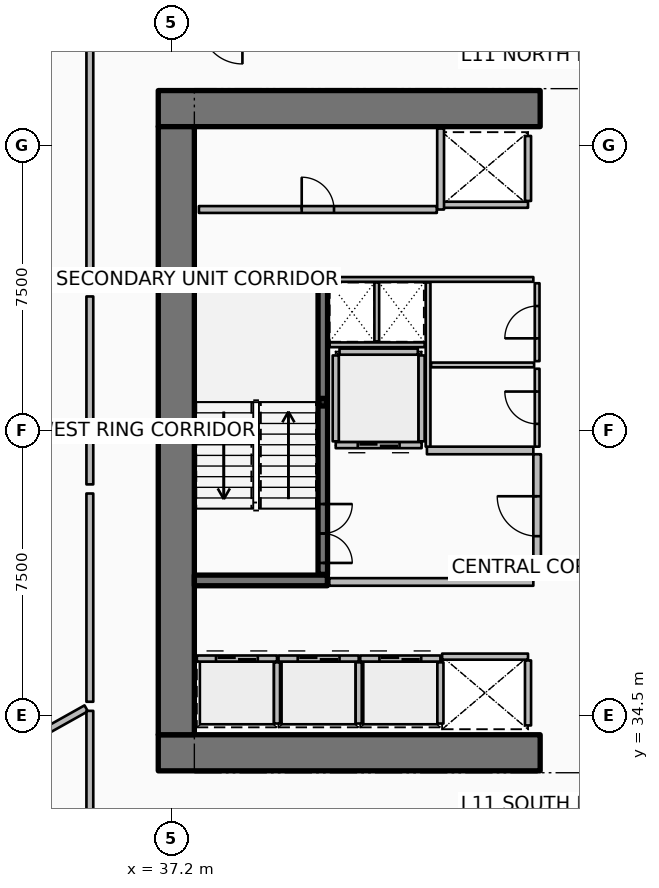
"""IFC4 building model, lengths in metres.
Left out: names, types, materials, properties, quantities, classifications, styles, units other than length and angle.
Written with IfcOpenShell. Run it as: python <this file> out.ifc"""

import sys

from ifc_helpers import new_model, si_unit, direction, frame, frame_2d, origin, origin_2d, place, context, subcontext, project, spatial, rectangle, hollow_rectangle, extrude, element, fill, save


model = new_model("IFC4")
c1 = context("Model", 3, precision=1e-05, world=origin(), true_north=direction((0.0, 1.0)))
c2 = subcontext(c1, "Body", "Model", "MODEL_VIEW")
j1 = project(units=[si_unit("LENGTHUNIT", "METRE"), si_unit("PLANEANGLEUNIT", "RADIAN")], contexts=[c1])
p1 = place(None, origin())
s1 = spatial("IfcSite", under=j1, at=p1, CompositionType="ELEMENT")
p2 = place(p1, origin())
s2 = spatial("IfcBuilding", under=s1, at=p2, CompositionType="ELEMENT")
p3 = place(p2, frame((0.0, 0.0, 48.9)))
s3 = spatial("IfcBuildingStorey", under=s2, at=p3, CompositionType="ELEMENT", Elevation=48.9)
for number, where, z_axis, x_axis in (
    (1, (36.85, 33.525, 0.0), (0.0, 0.0, 1.0), (1.0, 0.0, 0.0)),
    (2, (36.85, 50.475, 0.0), (0.0, 0.0, 1.0), (1.0, 0.0, 0.0)),
):
    element("IfcWall", number, at=place(p3, frame(where, z_axis=z_axis, x_axis=x_axis)), inside=s3, PredefinedType="SHEAR", context=c2, shape_type="SweptSolid", body=[
        extrude(rectangle(XDim=10.05, YDim=0.95, at=frame_2d((5.025, 0.0))), origin(), (0.0, 0.0, 1.0), 3.75),
    ])
p4 = place(p3, frame((37.325, 34.0, 0.0), z_axis=(0.0, 0.0, 1.0), x_axis=(0.0, 1.0, 0.0)))
e3 = element("IfcWall", 3, at=p4, inside=s3, PredefinedType="SHEAR", context=c2, shape_type="SweptSolid", body=[
    extrude(rectangle(XDim=16.0, YDim=0.95, at=frame_2d((8.0, 0.0))), origin(), (0.0, 0.0, 1.0), 3.75),
])
for number, where, z_axis, x_axis in (
    (4, (37.8, 38.06, 0.0), (0.0, 0.0, 1.0), (1.0, 0.0, 0.0)),
    (5, (37.8, 45.94, 0.0), (0.0, 0.0, 1.0), (1.0, 0.0, 0.0)),
):
    element("IfcWall", number, at=place(p3, frame(where, z_axis=z_axis, x_axis=x_axis)), inside=s3, PredefinedType="SHEAR", context=c2, shape_type="SweptSolid", body=[
        extrude(rectangle(XDim=3.5, YDim=0.28, at=frame_2d((1.75, 0.0))), origin(), (0.0, 0.0, 1.0), 3.75),
    ])
p5 = place(p3, frame((41.18, 42.75, 0.0), z_axis=(0.0, 0.0, 1.0), x_axis=(1.0, 0.0, 0.0)))
e6 = element("IfcColumn", 6, at=p5, inside=s3, PredefinedType="COLUMN", context=c2, shape_type="SweptSolid", body=[
    extrude(hollow_rectangle(XDim=0.2, YDim=0.2, WallThickness=0.01, InnerFilletRadius=0.01, OuterFilletRadius=0.02, at=origin_2d()), origin(), (0.0, 0.0, 1.0), 1.67),
])
p6 = place(p3, frame((41.18, 38.22, 0.0), z_axis=(0.0, 0.0, 1.0), x_axis=(0.0, 1.0, 0.0)))
e7 = element("IfcWall", 7, at=p6, inside=s3, PredefinedType="SOLIDWALL", context=c2, shape_type="SweptSolid", body=[
    extrude(rectangle(XDim=7.56, YDim=0.25, at=frame_2d((3.78, 0.0))), origin(), (0.0, 0.0, 1.0), 3.5),
])
p7 = place(p6, frame((0.3, 0.0, 0.0)))
e8 = element("IfcOpeningElement", 8, at=p7, cuts=e7, PredefinedType="OPENING", context=c2, shape_type="SweptSolid", body=[
    extrude(rectangle(XDim=1.55, YDim=2.15, at=frame_2d((0.775, 1.075))), frame((0.0, 0.135, 0.0), z_axis=(0.0, -1.0, 0.0), x_axis=(1.0, 0.0, 0.0)), (0.0, 0.0, 1.0), 0.27),
])
p8 = place(p3, frame((37.865, 36.005, 0.0), z_axis=(0.0, 0.0, 1.0), x_axis=(1.0, 0.0, 0.0)))
e9 = element("IfcWall", 9, at=p8, inside=s3, PredefinedType="PARTITIONING", context=c2, shape_type="SweptSolid", body=[
    extrude(rectangle(XDim=2.11, YDim=0.16, at=frame_2d((1.055, 0.0))), origin(), (0.0, 0.0, 1.0), 3.5),
])
p9 = place(p8, frame((0.505, 0.0, 0.0)))
e10 = element("IfcOpeningElement", 10, at=p9, cuts=e9, PredefinedType="OPENING", context=c2, shape_type="SweptSolid", body=[
    extrude(rectangle(XDim=1.1, YDim=2.1, at=frame_2d((0.55, 1.05))), frame((0.0, 0.09, 0.0), z_axis=(0.0, -1.0, 0.0), x_axis=(1.0, 0.0, 0.0)), (0.0, 0.0, 1.0), 0.18),
])
p10 = place(p3, frame((39.975, 34.295, 0.0), z_axis=(0.0, 0.0, 1.0), x_axis=(0.0, 1.0, 0.0)))
e11 = element("IfcWall", 11, at=p10, inside=s3, PredefinedType="PARTITIONING", context=c2, shape_type="SweptSolid", body=[
    extrude(rectangle(XDim=1.61, YDim=0.16, at=frame_2d((0.805, 0.0))), origin(), (0.0, 0.0, 1.0), 3.5),
])
p11 = place(p3, frame((40.015, 36.005, 0.0), z_axis=(0.0, 0.0, 1.0), x_axis=(1.0, 0.0, 0.0)))
e12 = element("IfcWall", 12, at=p11, inside=s3, PredefinedType="PARTITIONING", context=c2, shape_type="SweptSolid", body=[
    extrude(rectangle(XDim=2.11, YDim=0.16, at=frame_2d((1.055, 0.0))), origin(), (0.0, 0.0, 1.0), 3.5),
])
p12 = place(p11, frame((0.505, 0.0, 0.0)))
e13 = element("IfcOpeningElement", 13, at=p12, cuts=e12, PredefinedType="OPENING", context=c2, shape_type="SweptSolid", body=[
    extrude(rectangle(XDim=1.1, YDim=2.1, at=frame_2d((0.55, 1.05))), frame((0.0, 0.09, 0.0), z_axis=(0.0, -1.0, 0.0), x_axis=(1.0, 0.0, 0.0)), (0.0, 0.0, 1.0), 0.18),
])
p13 = place(p3, frame((42.125, 34.295, 0.0), z_axis=(0.0, 0.0, 1.0), x_axis=(0.0, 1.0, 0.0)))
e14 = element("IfcWall", 14, at=p13, inside=s3, PredefinedType="PARTITIONING", context=c2, shape_type="SweptSolid", body=[
    extrude(rectangle(XDim=1.61, YDim=0.16, at=frame_2d((0.805, 0.0))), origin(), (0.0, 0.0, 1.0), 3.5),
])
p14 = place(p3, frame((42.165, 36.005, 0.0), z_axis=(0.0, 0.0, 1.0), x_axis=(1.0, 0.0, 0.0)))
e15 = element("IfcWall", 15, at=p14, inside=s3, PredefinedType="PARTITIONING", context=c2, shape_type="SweptSolid", body=[
    extrude(rectangle(XDim=2.11, YDim=0.16, at=frame_2d((1.055, 0.0))), origin(), (0.0, 0.0, 1.0), 3.5),
])
p15 = place(p14, frame((0.505, 0.0, 0.0)))
e16 = element("IfcOpeningElement", 16, at=p15, cuts=e15, PredefinedType="OPENING", context=c2, shape_type="SweptSolid", body=[
    extrude(rectangle(XDim=1.1, YDim=2.1, at=frame_2d((0.55, 1.05))), frame((0.0, 0.09, 0.0), z_axis=(0.0, -1.0, 0.0), x_axis=(1.0, 0.0, 0.0)), (0.0, 0.0, 1.0), 0.18),
])
p16 = place(p3, frame((44.275, 34.295, 0.0), z_axis=(0.0, 0.0, 1.0), x_axis=(0.0, 1.0, 0.0)))
e17 = element("IfcWall", 17, at=p16, inside=s3, PredefinedType="PARTITIONING", context=c2, shape_type="SweptSolid", body=[
    extrude(rectangle(XDim=1.61, YDim=0.16, at=frame_2d((0.805, 0.0))), origin(), (0.0, 0.0, 1.0), 3.5),
])
p17 = place(p3, frame((46.58, 47.945, 0.0), z_axis=(0.0, 0.0, 1.0), x_axis=(-1.0, 0.0, 0.0)))
e18 = element("IfcWall", 18, at=p17, inside=s3, PredefinedType="PARTITIONING", context=c2, shape_type="SweptSolid", body=[
    extrude(rectangle(XDim=2.26, YDim=0.16, at=frame_2d((1.13, 0.0))), origin(), (0.0, 0.0, 1.0), 3.5),
])
p18 = place(p3, frame((46.58, 48.045, 0.0), z_axis=(0.0, 0.0, 1.0), x_axis=(0.0, 1.0, 0.0)))
e19 = element("IfcWall", 19, at=p18, inside=s3, PredefinedType="PARTITIONING", context=c2, shape_type="SweptSolid", body=[
    extrude(rectangle(XDim=1.71, YDim=0.16, at=frame_2d((0.855, 0.0))), origin(), (0.0, 0.0, 1.0), 3.5),
])
p19 = place(p3, frame((44.32, 36.055, 0.0), z_axis=(0.0, 0.0, 1.0), x_axis=(1.0, 0.0, 0.0)))
e20 = element("IfcWall", 20, at=p19, inside=s3, PredefinedType="PARTITIONING", context=c2, shape_type="SweptSolid", body=[
    extrude(rectangle(XDim=2.26, YDim=0.16, at=frame_2d((1.13, 0.0))), origin(), (0.0, 0.0, 1.0), 3.5),
])
p20 = place(p3, frame((46.58, 34.245, 0.0), z_axis=(0.0, 0.0, 1.0), x_axis=(0.0, 1.0, 0.0)))
e21 = element("IfcWall", 21, at=p20, inside=s3, PredefinedType="PARTITIONING", context=c2, shape_type="SweptSolid", body=[
    extrude(rectangle(XDim=1.71, YDim=0.16, at=frame_2d((0.855, 0.0))), origin(), (0.0, 0.0, 1.0), 3.5),
])
p21 = place(p3, frame((43.78, 41.62, 0.0), z_axis=(0.0, 0.0, 1.0), x_axis=(-1.0, 0.0, 0.0)))
e22 = element("IfcWall", 22, at=p21, inside=s3, PredefinedType="PARTITIONING", context=c2, shape_type="SweptSolid", body=[
    extrude(rectangle(XDim=2.26, YDim=0.16, at=frame_2d((1.13, 0.0))), origin(), (0.0, 0.0, 1.0), 3.5),
])
p22 = place(p21, frame((0.58, 0.0, 0.0)))
e23 = element("IfcOpeningElement", 23, at=p22, cuts=e22, PredefinedType="OPENING", context=c2, shape_type="SweptSolid", body=[
    extrude(rectangle(XDim=1.1, YDim=2.1, at=frame_2d((0.55, 1.05))), frame((0.0, 0.09, 0.0), z_axis=(0.0, -1.0, 0.0), x_axis=(1.0, 0.0, 0.0)), (0.0, 0.0, 1.0), 0.18),
])
for number, where, z_axis, x_axis in (
    (24, (43.78, 41.72, 0.0), (0.0, 0.0, 1.0), (0.0, 1.0, 0.0)),
    (25, (41.52, 41.72, 0.0), (0.0, 0.0, 1.0), (0.0, 1.0, 0.0)),
):
    element("IfcWall", number, at=place(p3, frame(where, z_axis=z_axis, x_axis=x_axis)), inside=s3, PredefinedType="PARTITIONING", context=c2, shape_type="SweptSolid", body=[
        extrude(rectangle(XDim=2.26, YDim=0.16, at=frame_2d((1.13, 0.0))), origin(), (0.0, 0.0, 1.0), 3.5),
    ])
p23 = place(p3, frame((41.62, 44.08, 0.0), z_axis=(0.0, 0.0, 1.0), x_axis=(1.0, 0.0, 0.0)))
e26 = element("IfcWall", 26, at=p23, inside=s3, PredefinedType="PARTITIONING", context=c2, shape_type="SweptSolid", body=[
    extrude(rectangle(XDim=2.06, YDim=0.16, at=frame_2d((1.03, 0.0))), origin(), (0.0, 0.0, 1.0), 3.5),
])
p24 = place(p3, frame((37.92, 47.82, 0.0), z_axis=(0.0, 0.0, 1.0), x_axis=(1.0, 0.0, 0.0)))
e27 = element("IfcWall", 27, at=p24, inside=s3, PredefinedType="PARTITIONING", context=c2, shape_type="SweptSolid", body=[
    extrude(rectangle(XDim=6.26, YDim=0.18, at=frame_2d((3.13, 0.0))), origin(), (0.0, 0.0, 1.0), 3.5),
])
p25 = place(p24, frame((2.705, 0.0, 0.0)))
e28 = element("IfcOpeningElement", 28, at=p25, cuts=e27, PredefinedType="OPENING", context=c2, shape_type="SweptSolid", body=[
    extrude(rectangle(XDim=0.85, YDim=2.06, at=frame_2d((0.425, 1.03))), frame((0.0, 0.1, 0.0), z_axis=(0.0, -1.0, 0.0), x_axis=(1.0, 0.0, 0.0)), (0.0, 0.0, 1.0), 0.2),
])
p26 = place(p3, frame((44.28, 47.82, 0.0), z_axis=(0.0, 0.0, 1.0), x_axis=(0.0, 1.0, 0.0)))
e29 = element("IfcWall", 29, at=p26, inside=s3, PredefinedType="PARTITIONING", context=c2, shape_type="SweptSolid", body=[
    extrude(rectangle(XDim=2.13, YDim=0.18, at=frame_2d((1.065, 0.0))), origin(), (0.0, 0.0, 1.0), 3.5),
])
p27 = place(p3, frame((41.35, 38.02, 0.0), z_axis=(0.0, 0.0, 1.0), x_axis=(1.0, 0.0, 0.0)))
e30 = element("IfcWall", 30, at=p27, inside=s3, PredefinedType="PARTITIONING", context=c2, shape_type="SweptSolid", body=[
    extrude(rectangle(XDim=5.37, YDim=0.2, at=frame_2d((2.685, 0.0))), origin(), (0.0, 0.0, 1.0), 3.5),
])
p28 = place(p3, frame((43.92, 41.48, 0.0), z_axis=(0.0, 0.0, 1.0), x_axis=(1.0, 0.0, 0.0)))
e31 = element("IfcWall", 31, at=p28, inside=s3, PredefinedType="PARTITIONING", context=c2, shape_type="SweptSolid", body=[
    extrude(rectangle(XDim=2.8, YDim=0.2, at=frame_2d((1.4, 0.0))), origin(), (0.0, 0.0, 1.0), 3.5),
])
p29 = place(p3, frame((46.82, 38.12, 0.0), z_axis=(0.0, 0.0, 1.0), x_axis=(0.0, 1.0, 0.0)))
e32 = element("IfcWall", 32, at=p29, inside=s3, PredefinedType="PARTITIONING", context=c2, shape_type="SweptSolid", body=[
    extrude(rectangle(XDim=3.26, YDim=0.2, at=frame_2d((1.63, 0.0))), origin(), (0.0, 0.0, 1.0), 3.5),
])
p30 = place(p29, frame((1.105, 0.0, 0.0)))
e33 = element("IfcOpeningElement", 33, at=p30, cuts=e32, PredefinedType="OPENING", context=c2, shape_type="SweptSolid", body=[
    extrude(rectangle(XDim=1.05, YDim=2.1, at=frame_2d((0.525, 1.05))), frame((0.0, 0.11, 0.0), z_axis=(0.0, -1.0, 0.0), x_axis=(1.0, 0.0, 0.0)), (0.0, 0.0, 1.0), 0.22),
])
p31 = place(p3, frame((41.36, 45.98, 0.0), z_axis=(0.0, 0.0, 1.0), x_axis=(1.0, 0.0, 0.0)))
e34 = element("IfcWall", 34, at=p31, inside=s3, PredefinedType="PARTITIONING", context=c2, shape_type="SweptSolid", body=[
    extrude(rectangle(XDim=5.36, YDim=0.125, at=frame_2d((2.68, 0.0))), origin(), (0.0, 0.0, 1.0), 2.94),
])
p32 = place(p3, frame((41.36, 44.26, 0.0), z_axis=(0.0, 0.0, 1.0), x_axis=(1.0, 0.0, 0.0)))
e35 = element("IfcWall", 35, at=p32, inside=s3, PredefinedType="PARTITIONING", context=c2, shape_type="SweptSolid", body=[
    extrude(rectangle(XDim=2.5, YDim=0.125, at=frame_2d((1.25, 0.0))), origin(), (0.0, 0.0, 1.0), 2.94),
])
p33 = place(p3, frame((42.6, 44.35, 0.0), z_axis=(0.0, 0.0, 1.0), x_axis=(0.0, 1.0, 0.0)))
e36 = element("IfcWall", 36, at=p33, inside=s3, PredefinedType="PARTITIONING", context=c2, shape_type="SweptSolid", body=[
    extrude(rectangle(XDim=1.55, YDim=0.125, at=frame_2d((0.775, 0.0))), origin(), (0.0, 0.0, 1.0), 2.94),
])
p34 = place(p3, frame((43.95, 41.58, 0.0), z_axis=(0.0, 0.0, 1.0), x_axis=(0.0, 1.0, 0.0)))
e37 = element("IfcWall", 37, at=p34, inside=s3, PredefinedType="PARTITIONING", context=c2, shape_type="SweptSolid", body=[
    extrude(rectangle(XDim=4.32, YDim=0.125, at=frame_2d((2.16, 0.0))), origin(), (0.0, 0.0, 1.0), 2.94),
])
p35 = place(p3, frame((44.03, 43.73, 0.0), z_axis=(0.0, 0.0, 1.0), x_axis=(1.0, 0.0, 0.0)))
e38 = element("IfcWall", 38, at=p35, inside=s3, PredefinedType="PARTITIONING", context=c2, shape_type="SweptSolid", body=[
    extrude(rectangle(XDim=2.71, YDim=0.125, at=frame_2d((1.355, 0.0))), origin(), (0.0, 0.0, 1.0), 2.94),
])
p36 = place(p3, frame((46.82, 41.58, 0.0), z_axis=(0.0, 0.0, 1.0), x_axis=(0.0, 1.0, 0.0)))
e39 = element("IfcWall", 39, at=p36, inside=s3, PredefinedType="PARTITIONING", context=c2, shape_type="SweptSolid", body=[
    extrude(rectangle(XDim=2.05, YDim=0.125, at=frame_2d((1.025, 0.0))), origin(), (0.0, 0.0, 1.0), 2.94),
])
p37 = place(p36, frame((0.6, 0.0, 0.0)))
e40 = element("IfcOpeningElement", 40, at=p37, cuts=e39, PredefinedType="OPENING", context=c2, shape_type="SweptSolid", body=[
    extrude(rectangle(XDim=0.85, YDim=2.06, at=frame_2d((0.425, 1.03))), frame((0.0, 0.073, 0.0), z_axis=(0.0, -1.0, 0.0), x_axis=(1.0, 0.0, 0.0)), (0.0, 0.0, 1.0), 0.145),
])
p38 = place(p3, frame((46.82, 43.83, 0.0), z_axis=(0.0, 0.0, 1.0), x_axis=(0.0, 1.0, 0.0)))
e41 = element("IfcWall", 41, at=p38, inside=s3, PredefinedType="PARTITIONING", context=c2, shape_type="SweptSolid", body=[
    extrude(rectangle(XDim=2.05, YDim=0.125, at=frame_2d((1.025, 0.0))), origin(), (0.0, 0.0, 1.0), 2.94),
])
p39 = place(p38, frame((0.6, 0.0, 0.0)))
e42 = element("IfcOpeningElement", 42, at=p39, cuts=e41, PredefinedType="OPENING", context=c2, shape_type="SweptSolid", body=[
    extrude(rectangle(XDim=0.85, YDim=2.06, at=frame_2d((0.425, 1.03))), frame((0.0, 0.073, 0.0), z_axis=(0.0, -1.0, 0.0), x_axis=(1.0, 0.0, 0.0)), (0.0, 0.0, 1.0), 0.145),
])
p40 = place(p3, frame((34.954, 34.694, 0.0), z_axis=(0.0, 0.0, 1.0), x_axis=(-0.872493465611, -0.488625779577, 0.0)))
e43 = element("IfcWall", 43, at=p40, inside=s3, PredefinedType="PARTITIONING", context=c2, shape_type="SweptSolid", body=[
    extrude(rectangle(XDim=16.586, YDim=0.18, at=frame_2d((8.293, 0.0))), origin(), (0.0, 0.0, 1.0), 2.867),
])
p41 = place(p3, frame((35.05, 52.089, 0.0), z_axis=(0.0, 0.0, 1.0), x_axis=(0.0, -1.0, 0.0)))
e44 = element("IfcWall", 44, at=p41, inside=s3, PredefinedType="PARTITIONING", context=c2, shape_type="SweptSolid", body=[
    extrude(rectangle(XDim=6.317, YDim=0.18, at=frame_2d((3.158, 0.0))), origin(), (0.0, 0.0, 1.0), 2.867),
])
p42 = place(p3, frame((35.05, 45.532, 0.0), z_axis=(0.0, 0.0, 1.0), x_axis=(0.0, -1.0, 0.0)))
e45 = element("IfcWall", 45, at=p42, inside=s3, PredefinedType="PARTITIONING", context=c2, shape_type="SweptSolid", body=[
    extrude(rectangle(XDim=4.945, YDim=0.18, at=frame_2d((2.472, 0.0))), origin(), (0.0, 0.0, 1.0), 2.867),
])
p43 = place(p3, frame((35.05, 40.347, 0.0), z_axis=(0.0, 0.0, 1.0), x_axis=(0.0, -1.0, 0.0)))
e46 = element("IfcWall", 46, at=p43, inside=s3, PredefinedType="PARTITIONING", context=c2, shape_type="SweptSolid", body=[
    extrude(rectangle(XDim=5.48, YDim=0.18, at=frame_2d((2.74, 0.0))), origin(), (0.0, 0.0, 1.0), 2.867),
])
p44 = place(p3, frame((35.05, 34.628, 0.0), z_axis=(0.0, 0.0, 1.0), x_axis=(0.0, -1.0, 0.0)))
e47 = element("IfcWall", 47, at=p44, inside=s3, PredefinedType="PARTITIONING", context=c2, shape_type="SweptSolid", body=[
    extrude(rectangle(XDim=3.258, YDim=0.18, at=frame_2d((1.629, 0.0))), origin(), (0.0, 0.0, 1.0), 2.867),
])
p45 = place(p7, origin())
e48 = element("IfcDoor", 48, at=p45, inside=s3, OperationType="DOUBLE_DOOR_SINGLE_SWING", PredefinedType="DOOR", context=c2, shape_type="SweptSolid", body=[
    extrude(rectangle(XDim=1.55, YDim=2.15, at=frame_2d((0.775, 1.075))), frame((0.0, 0.025, 0.0), z_axis=(0.0, -1.0, 0.0), x_axis=(1.0, 0.0, 0.0)), (0.0, 0.0, 1.0), 0.05),
])
fill(e8, e48)
p46 = place(p9, origin())
e49 = element("IfcDoor", 49, at=p46, inside=s3, OperationType="DOUBLE_DOOR_SLIDING", PredefinedType="DOOR", context=c2, shape_type="SweptSolid", body=[
    extrude(rectangle(XDim=1.1, YDim=2.1, at=frame_2d((0.55, 1.05))), frame((0.0, 0.025, 0.0), z_axis=(0.0, -1.0, 0.0), x_axis=(1.0, 0.0, 0.0)), (0.0, 0.0, 1.0), 0.05),
])
fill(e10, e49)
p47 = place(p12, origin())
e50 = element("IfcDoor", 50, at=p47, inside=s3, OperationType="DOUBLE_DOOR_SLIDING", PredefinedType="DOOR", context=c2, shape_type="SweptSolid", body=[
    extrude(rectangle(XDim=1.1, YDim=2.1, at=frame_2d((0.55, 1.05))), frame((0.0, 0.025, 0.0), z_axis=(0.0, -1.0, 0.0), x_axis=(1.0, 0.0, 0.0)), (0.0, 0.0, 1.0), 0.05),
])
fill(e13, e50)
p48 = place(p15, origin())
e51 = element("IfcDoor", 51, at=p48, inside=s3, OperationType="DOUBLE_DOOR_SLIDING", PredefinedType="DOOR", context=c2, shape_type="SweptSolid", body=[
    extrude(rectangle(XDim=1.1, YDim=2.1, at=frame_2d((0.55, 1.05))), frame((0.0, 0.025, 0.0), z_axis=(0.0, -1.0, 0.0), x_axis=(1.0, 0.0, 0.0)), (0.0, 0.0, 1.0), 0.05),
])
fill(e16, e51)
p49 = place(p22, origin())
e52 = element("IfcDoor", 52, at=p49, inside=s3, OperationType="DOUBLE_DOOR_SLIDING", PredefinedType="DOOR", context=c2, shape_type="SweptSolid", body=[
    extrude(rectangle(XDim=1.1, YDim=2.1, at=frame_2d((0.55, 1.05))), frame((0.0, 0.025, 0.0), z_axis=(0.0, -1.0, 0.0), x_axis=(1.0, 0.0, 0.0)), (0.0, 0.0, 1.0), 0.05),
])
fill(e23, e52)
p50 = place(p25, origin())
e53 = element("IfcDoor", 53, at=p50, inside=s3, OperationType="SINGLE_SWING_LEFT", PredefinedType="DOOR", context=c2, shape_type="SweptSolid", body=[
    extrude(rectangle(XDim=0.85, YDim=2.06, at=frame_2d((0.425, 1.03))), frame((0.0, 0.025, 0.0), z_axis=(0.0, -1.0, 0.0), x_axis=(1.0, 0.0, 0.0)), (0.0, 0.0, 1.0), 0.05),
])
fill(e28, e53)
p51 = place(p30, origin())
e54 = element("IfcDoor", 54, at=p51, inside=s3, OperationType="SINGLE_SWING_RIGHT", PredefinedType="DOOR", context=c2, shape_type="SweptSolid", body=[
    extrude(rectangle(XDim=1.05, YDim=2.1, at=frame_2d((0.525, 1.05))), frame((0.0, 0.025, 0.0), z_axis=(0.0, -1.0, 0.0), x_axis=(1.0, 0.0, 0.0)), (0.0, 0.0, 1.0), 0.05),
])
fill(e33, e54)
p52 = place(p37, origin())
e55 = element("IfcDoor", 55, at=p52, inside=s3, OperationType="SINGLE_SWING_RIGHT", PredefinedType="DOOR", context=c2, shape_type="SweptSolid", body=[
    extrude(rectangle(XDim=0.85, YDim=2.06, at=frame_2d((0.425, 1.03))), frame((0.0, 0.025, 0.0), z_axis=(0.0, -1.0, 0.0), x_axis=(1.0, 0.0, 0.0)), (0.0, 0.0, 1.0), 0.05),
])
fill(e40, e55)
p53 = place(p39, origin())
e56 = element("IfcDoor", 56, at=p53, inside=s3, OperationType="SINGLE_SWING_LEFT", PredefinedType="DOOR", context=c2, shape_type="SweptSolid", body=[
    extrude(rectangle(XDim=0.85, YDim=2.06, at=frame_2d((0.425, 1.03))), frame((0.0, 0.025, 0.0), z_axis=(0.0, -1.0, 0.0), x_axis=(1.0, 0.0, 0.0)), (0.0, 0.0, 1.0), 0.05),
])
fill(e42, e56)
save(model, sys.argv[1])
